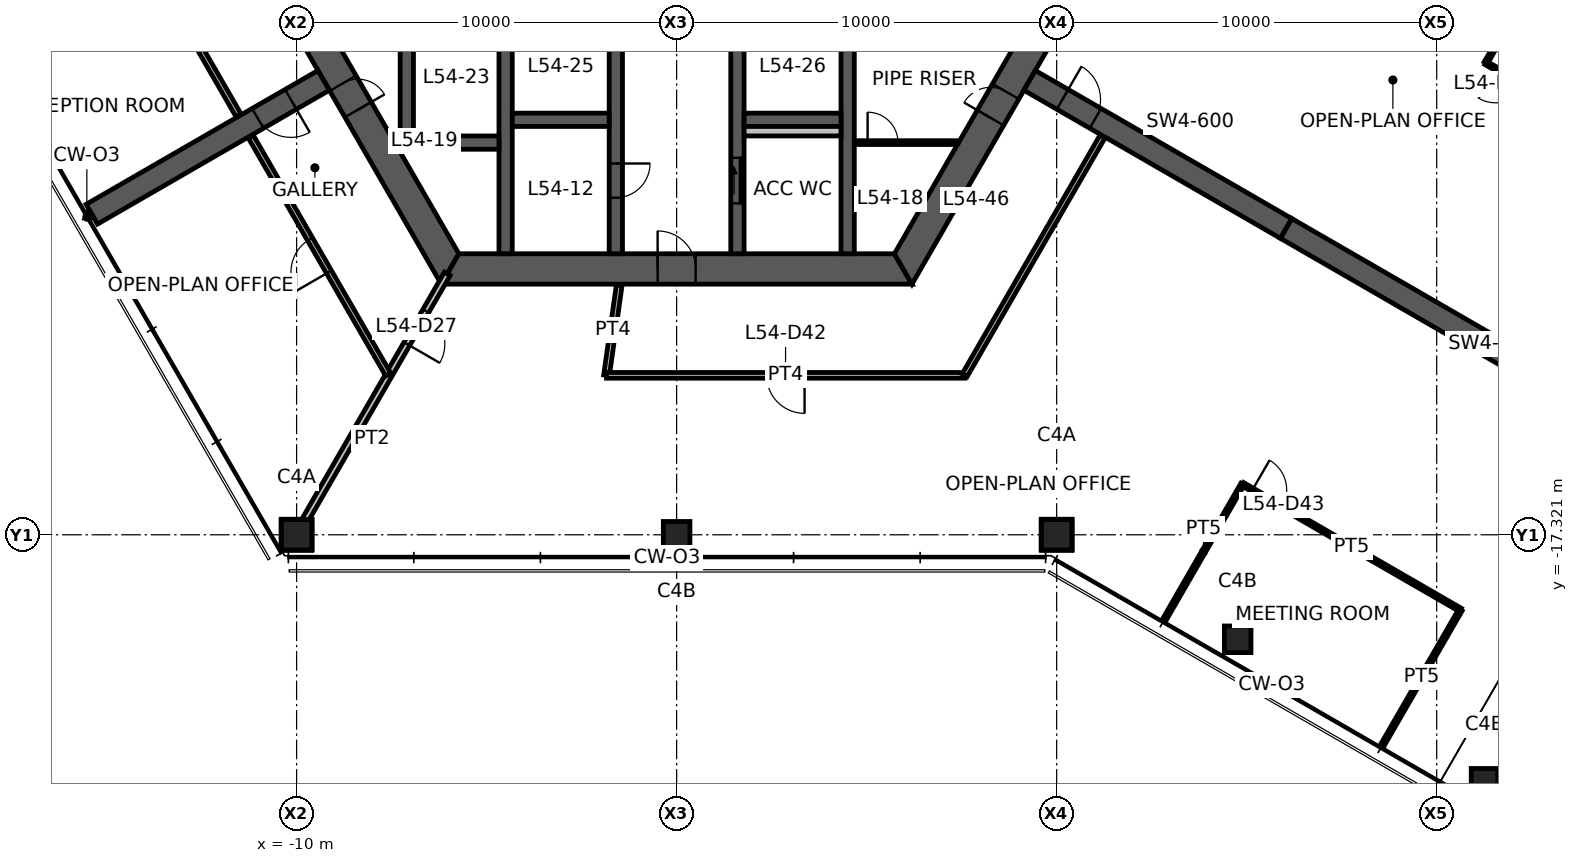
"""IFC4 building model, lengths in metres.
Left out: names, types, materials, properties, quantities, classifications, styles, units other than length and angle.
Written with IfcOpenShell. Run it as: python <this file> out.ifc"""

import sys

from ifc_helpers import new_model, si_unit, direction, frame, frame_2d, origin, origin_2d, place, context, subcontext, project, spatial, polyline, rectangle, hollow_rectangle, outline, extrude, element, fill, save


model = new_model("IFC4")
c1 = context("Model", 3, precision=1e-05, world=origin(), true_north=direction((0.0, 1.0)))
c2 = subcontext(c1, "Body", "Model", "MODEL_VIEW")
j1 = project(units=[si_unit("LENGTHUNIT", "METRE"), si_unit("PLANEANGLEUNIT", "RADIAN")], contexts=[c1])
p1 = place(None, origin())
s1 = spatial("IfcSite", under=j1, at=p1, CompositionType="ELEMENT")
p2 = place(p1, origin())
s2 = spatial("IfcBuilding", under=s1, at=p2, CompositionType="ELEMENT")
p3 = place(p2, frame((0.0, 0.0, 216.7)))
s3 = spatial("IfcBuildingStorey", under=s2, at=p3, CompositionType="ELEMENT", Elevation=216.7)
for number, where, z_axis, x_axis in (
    (1, (-10.0, -17.321, 0.0), (0.0, 0.0, 1.0), (1.0, 0.0, 0.0)),
    (2, (10.0, -17.321, 0.0), (0.0, 0.0, 1.0), (1.0, 0.0, 0.0)),
):
    element("IfcColumn", number, at=place(p3, frame(where, z_axis=z_axis, x_axis=x_axis)), inside=s3, PredefinedType="COLUMN", context=c2, shape_type="SweptSolid", body=[
        extrude(hollow_rectangle(XDim=0.8, YDim=0.8, WallThickness=0.04, at=origin_2d()), origin(), (0.0, 0.0, 1.0), 3.9),
    ])
for number, where, z_axis, x_axis in (
    (3, (0.0, -17.321, 0.0), (0.0, 0.0, 1.0), (1.0, 0.0, 0.0)),
    (4, (14.763, -20.071, 0.0), (0.0, 0.0, 1.0), (1.0, 0.0, 0.0)),
    (5, (21.258, -23.821, 0.0), (0.0, 0.0, 1.0), (1.0, 0.0, 0.0)),
):
    element("IfcColumn", number, at=place(p3, frame(where, z_axis=z_axis, x_axis=x_axis)), inside=s3, PredefinedType="COLUMN", context=c2, shape_type="SweptSolid", body=[
        extrude(hollow_rectangle(XDim=0.7, YDim=0.7, WallThickness=0.032, at=origin_2d()), origin(), (0.0, 0.0, 1.0), 3.9),
    ])
p4 = place(p3, frame((-11.922, 0.0, 0.0), z_axis=(0.0, 0.0, 1.0), x_axis=(0.500004296715, -0.866022923061, 0.0)))
e6 = element("IfcWall", 6, at=p4, inside=s3, PredefinedType="SHEAR", context=c2, shape_type="SweptSolid", body=[
    extrude(outline(polyline([(-0.231, -0.4), (6.281, -0.4), (7.081, -0.4), (12.153, -0.4), (11.691, 0.4), (7.081, 0.4), (6.281, 0.4), (0.231, 0.4), (-0.231, -0.4)])), origin(), (0.0, 0.0, 1.0), 3.9),
])
p5 = place(p4, frame((6.281, 0.0, 0.0)))
e7 = element("IfcOpeningElement", 7, at=p5, cuts=e6, PredefinedType="OPENING", context=c2, shape_type="SweptSolid", body=[
    extrude(rectangle(XDim=0.8, YDim=2.1, at=frame_2d((0.4, 1.05))), frame((0.0, 0.41, 0.0), z_axis=(0.0, -1.0, 0.0), x_axis=(1.0, 0.0, 0.0)), (0.0, 0.0, 1.0), 0.82),
])
p6 = place(p3, frame((-5.961, -10.325, 0.0), z_axis=(0.0, 0.0, 1.0), x_axis=(1.0, 0.0, 0.0)))
e8 = element("IfcWall", 8, at=p6, inside=s3, PredefinedType="SHEAR", context=c2, shape_type="SweptSolid", body=[
    extrude(outline(polyline([(-0.231, -0.4), (5.461, -0.4), (6.461, -0.4), (12.153, -0.4), (11.691, 0.4), (6.461, 0.4), (5.461, 0.4), (0.231, 0.4), (-0.231, -0.4)])), origin(), (0.0, 0.0, 1.0), 3.9),
])
p7 = place(p6, frame((5.461, 0.0, 0.0)))
e9 = element("IfcOpeningElement", 9, at=p7, cuts=e8, PredefinedType="OPENING", context=c2, shape_type="SweptSolid", body=[
    extrude(rectangle(XDim=1.0, YDim=2.1, at=frame_2d((0.5, 1.05))), frame((0.0, 0.41, 0.0), z_axis=(0.0, -1.0, 0.0), x_axis=(1.0, 0.0, 0.0)), (0.0, 0.0, 1.0), 0.82),
])
p8 = place(p3, frame((5.961, -10.325, 0.0), z_axis=(0.0, 0.0, 1.0), x_axis=(0.500004296715, 0.866022923061, 0.0)))
e10 = element("IfcWall", 10, at=p8, inside=s3, PredefinedType="SHEAR", context=c2, shape_type="SweptSolid", body=[
    extrude(outline(polyline([(-0.231, -0.4), (4.594, -0.4), (5.394, -0.4), (12.153, -0.4), (11.691, 0.4), (5.394, 0.4), (4.594, 0.4), (0.231, 0.4), (-0.231, -0.4)])), origin(), (0.0, 0.0, 1.0), 3.9),
])
p9 = place(p8, frame((4.594, 0.0, 0.0)))
e11 = element("IfcOpeningElement", 11, at=p9, cuts=e10, PredefinedType="OPENING", context=c2, shape_type="SweptSolid", body=[
    extrude(rectangle(XDim=0.8, YDim=2.1, at=frame_2d((0.4, 1.05))), frame((0.0, 0.41, 0.0), z_axis=(0.0, -1.0, 0.0), x_axis=(1.0, 0.0, 0.0)), (0.0, 0.0, 1.0), 0.82),
])
p10 = place(p3, frame((-9.288, -5.363, 0.0), z_axis=(0.0, 0.0, 1.0), x_axis=(-0.866027473358, -0.499996415376, 0.0)))
e12 = element("IfcWall", 12, at=p10, inside=s3, PredefinedType="SHEAR", context=c2, shape_type="SweptSolid", body=[
    extrude(rectangle(XDim=7.045, YDim=0.6, at=frame_2d((3.523, 0.0))), origin(), (0.0, 0.0, 1.0), 3.9),
])
p11 = place(p10, frame((1.0, 0.0, 0.0)))
e13 = element("IfcOpeningElement", 13, at=p11, cuts=e12, PredefinedType="OPENING", context=c2, shape_type="SweptSolid", body=[
    extrude(rectangle(XDim=1.0, YDim=2.1, at=frame_2d((0.5, 1.05))), frame((0.0, 0.31, 0.0), z_axis=(0.0, -1.0, 0.0), x_axis=(1.0, 0.0, 0.0)), (0.0, 0.0, 1.0), 0.62),
])
p12 = place(p3, frame((9.288, -5.363, 0.0), z_axis=(0.0, 0.0, 1.0), x_axis=(0.866031736626, -0.499989031036, 0.0)))
e14 = element("IfcWall", 14, at=p12, inside=s3, PredefinedType="SHEAR", context=c2, shape_type="SweptSolid", body=[
    extrude(rectangle(XDim=7.796, YDim=0.6, at=frame_2d((3.898, 0.0))), origin(), (0.0, 0.0, 1.0), 3.9),
])
p13 = place(p12, frame((1.0, 0.0, 0.0)))
e15 = element("IfcOpeningElement", 15, at=p13, cuts=e14, PredefinedType="OPENING", context=c2, shape_type="SweptSolid", body=[
    extrude(rectangle(XDim=1.0, YDim=2.1, at=frame_2d((0.5, 1.05))), frame((0.0, 0.31, 0.0), z_axis=(0.0, -1.0, 0.0), x_axis=(1.0, 0.0, 0.0)), (0.0, 0.0, 1.0), 0.62),
])
p14 = place(p3, frame((16.039, -9.26, 0.0), z_axis=(0.0, 0.0, 1.0), x_axis=(0.866024837091, -0.50000098154, 0.0)))
e16 = element("IfcWall", 16, at=p14, inside=s3, PredefinedType="SHEAR", context=c2, shape_type="SweptSolid", body=[
    extrude(rectangle(XDim=13.0, YDim=0.6, at=frame_2d((6.5, 0.0))), origin(), (0.0, 0.0, 1.0), 3.9),
])
p15 = place(p3, frame((-1.6, -3.775, 0.0), z_axis=(0.0, 0.0, 1.0), x_axis=(0.0, -1.0, 0.0)))
e17 = element("IfcWall", 17, at=p15, inside=s3, PredefinedType="SHEAR", context=c2, shape_type="SweptSolid", body=[
    extrude(rectangle(XDim=6.15, YDim=0.35, at=frame_2d((3.075, 0.0))), origin(), (0.0, 0.0, 1.0), 3.9),
])
p16 = place(p15, frame((3.775, 0.0, 0.0)))
e18 = element("IfcOpeningElement", 18, at=p16, cuts=e17, PredefinedType="OPENING", context=c2, shape_type="SweptSolid", body=[
    extrude(rectangle(XDim=0.9, YDim=2.1, at=frame_2d((0.45, 1.05))), frame((0.0, 0.185, 0.0), z_axis=(0.0, -1.0, 0.0), x_axis=(1.0, 0.0, 0.0)), (0.0, 0.0, 1.0), 0.37),
])
p17 = place(p3, frame((1.6, -3.775, 0.0), z_axis=(0.0, 0.0, 1.0), x_axis=(0.0, -1.0, 0.0)))
e19 = element("IfcWall", 19, at=p17, inside=s3, PredefinedType="SHEAR", context=c2, shape_type="SweptSolid", body=[
    extrude(rectangle(XDim=6.15, YDim=0.35, at=frame_2d((3.075, 0.0))), origin(), (0.0, 0.0, 1.0), 3.9),
])
p18 = place(p17, frame((3.625, 0.0, 0.0)))
e20 = element("IfcOpeningElement", 20, at=p18, cuts=e19, PredefinedType="OPENING", context=c2, shape_type="SweptSolid", body=[
    extrude(rectangle(XDim=1.2, YDim=2.1, at=frame_2d((0.6, 1.05))), frame((0.0, 0.185, 0.0), z_axis=(0.0, -1.0, 0.0), x_axis=(1.0, 0.0, 0.0)), (0.0, 0.0, 1.0), 0.37),
])
for number, where, z_axis, x_axis in (
    (21, (-4.5, -3.775, 0.0), (0.0, 0.0, 1.0), (0.0, -1.0, 0.0)),
    (22, (4.5, -3.775, 0.0), (0.0, 0.0, 1.0), (0.0, -1.0, 0.0)),
):
    element("IfcWall", number, at=place(p3, frame(where, z_axis=z_axis, x_axis=x_axis)), inside=s3, PredefinedType="SHEAR", context=c2, shape_type="SweptSolid", body=[
        extrude(rectangle(XDim=6.15, YDim=0.35, at=frame_2d((3.075, 0.0))), origin(), (0.0, 0.0, 1.0), 3.9),
    ])
for number, where, z_axis, x_axis in (
    (23, (-4.325, -6.4, 0.0), (0.0, 0.0, 1.0), (1.0, 0.0, 0.0)),
    (24, (1.775, -6.4, 0.0), (0.0, 0.0, 1.0), (1.0, 0.0, 0.0)),
):
    element("IfcWall", number, at=place(p3, frame(where, z_axis=z_axis, x_axis=x_axis)), inside=s3, PredefinedType="SHEAR", context=c2, shape_type="SweptSolid", body=[
        extrude(rectangle(XDim=2.55, YDim=0.35, at=frame_2d((1.275, 0.0))), origin(), (0.0, 0.0, 1.0), 3.9),
    ])
p19 = place(p3, frame((-7.275, -7.0, 0.0), z_axis=(0.0, 0.0, 1.0), x_axis=(1.0, 0.0, 0.0)))
e25 = element("IfcWall", 25, at=p19, inside=s3, PredefinedType="SHEAR", context=c2, shape_type="SweptSolid", body=[
    extrude(rectangle(XDim=2.6, YDim=0.35, at=frame_2d((1.3, 0.0))), origin(), (0.0, 0.0, 1.0), 3.9),
])
p20 = place(p3, frame((-7.1, -3.775, 0.0), z_axis=(0.0, 0.0, 1.0), x_axis=(0.0, -1.0, 0.0)))
e26 = element("IfcWall", 26, at=p20, inside=s3, PredefinedType="SHEAR", context=c2, shape_type="SweptSolid", body=[
    extrude(rectangle(XDim=3.05, YDim=0.35, at=frame_2d((1.525, 0.0))), origin(), (0.0, 0.0, 1.0), 3.9),
])
p21 = place(p3, frame((1.775, -6.7, 0.0), z_axis=(0.0, 0.0, 1.0), x_axis=(1.0, 0.0, 0.0)))
e27 = element("IfcWall", 27, at=p21, inside=s3, PredefinedType="PLUMBINGWALL", context=c2, shape_type="SweptSolid", body=[
    extrude(rectangle(XDim=2.55, YDim=0.25, at=frame_2d((1.275, 0.0))), origin(), (0.0, 0.0, 1.0), 3.9),
])
p22 = place(p3, frame((4.675, -7.0, 0.0), z_axis=(0.0, 0.0, 1.0), x_axis=(1.0, 0.0, 0.0)))
e28 = element("IfcWall", 28, at=p22, inside=s3, PredefinedType="PARTITIONING", context=c2, shape_type="SweptSolid", body=[
    extrude(outline(polyline([(0.0, -0.05), (0.35, -0.05), (1.15, -0.05), (2.715, -0.05), (2.744, 0.0), (2.75, 0.05), (1.15, 0.05), (0.35, 0.05), (0.0, 0.05), (0.0, -0.05)])), origin(), (0.0, 0.0, 1.0), 2.95),
])
p23 = place(p22, frame((0.35, 0.0, 0.0)))
e29 = element("IfcOpeningElement", 29, at=p23, cuts=e28, PredefinedType="OPENING", context=c2, shape_type="SweptSolid", body=[
    extrude(rectangle(XDim=0.8, YDim=2.1, at=frame_2d((0.4, 1.05))), frame((0.0, 0.06, 0.0), z_axis=(0.0, -1.0, 0.0), x_axis=(1.0, 0.0, 0.0)), (0.0, 0.0, 1.0), 0.12),
])
p24 = place(p3, frame((-6.035, -10.453, 0.0), z_axis=(0.0, 0.0, 1.0), x_axis=(-0.499989830942, -0.866031274813, 0.0)))
e30 = element("IfcWall", 30, at=p24, inside=s3, PredefinedType="PARTITIONING", context=c2, shape_type="SweptSolid", body=[
    extrude(rectangle(XDim=7.93, YDim=0.175, at=frame_2d((3.965, 0.0))), origin(), (0.0, 0.0, 1.0), 3.05),
])
p25 = place(p24, frame((1.13, 0.0, 0.0)))
e31 = element("IfcOpeningElement", 31, at=p25, cuts=e30, PredefinedType="OPENING", context=c2, shape_type="SweptSolid", body=[
    extrude(rectangle(XDim=1.0, YDim=2.1, at=frame_2d((0.5, 1.05))), frame((0.0, 0.098, 0.0), z_axis=(0.0, -1.0, 0.0), x_axis=(1.0, 0.0, 0.0)), (0.0, 0.0, 1.0), 0.195),
])
p26 = place(p3, frame((-11.527, -6.285, 0.0), z_axis=(0.0, 0.0, 1.0), x_axis=(-0.500003537243, 0.866023361547, 0.0)))
e32 = element("IfcWall", 32, at=p26, inside=s3, PredefinedType="PARTITIONING", context=c2, shape_type="SweptSolid", body=[
    extrude(rectangle(XDim=6.516, YDim=0.15, at=frame_2d((3.258, 0.0))), origin(), (0.0, 0.0, 1.0), 2.95),
])
p27 = place(p3, frame((-7.589, -13.105, 0.0), z_axis=(0.0, 0.0, 1.0), x_axis=(-0.499986333712, 0.866033293876, 0.0)))
e33 = element("IfcWall", 33, at=p27, inside=s3, PredefinedType="PARTITIONING", context=c2, shape_type="SweptSolid", body=[
    extrude(rectangle(XDim=7.235, YDim=0.15, at=frame_2d((3.617, 0.0))), origin(), (0.0, 0.0, 1.0), 2.95),
])
p28 = place(p27, frame((3.117, 0.0, 0.0)))
e34 = element("IfcOpeningElement", 34, at=p28, cuts=e33, PredefinedType="OPENING", context=c2, shape_type="SweptSolid", body=[
    extrude(rectangle(XDim=1.0, YDim=2.1, at=frame_2d((0.5, 1.05))), frame((0.0, 0.085, 0.0), z_axis=(0.0, -1.0, 0.0), x_axis=(1.0, 0.0, 0.0)), (0.0, 0.0, 1.0), 0.17),
])
p29 = place(p3, frame((21.292, -4.903, 0.0), z_axis=(0.0, 0.0, 1.0), x_axis=(0.500000428765, 0.866025156237, 0.0)))
e35 = element("IfcWall", 35, at=p29, inside=s3, PredefinedType="PARTITIONING", context=c2, shape_type="SweptSolid", body=[
    extrude(rectangle(XDim=4.08, YDim=0.1, at=frame_2d((2.04, 0.0))), origin(), (0.0, 0.0, 1.0), 2.95),
])
p30 = place(p3, frame((27.025, -8.213, 0.0), z_axis=(0.0, 0.0, 1.0), x_axis=(-0.866021597574, 0.500006592492, 0.0)))
e36 = element("IfcWall", 36, at=p30, inside=s3, PredefinedType="PARTITIONING", context=c2, shape_type="SweptSolid", body=[
    extrude(rectangle(XDim=6.62, YDim=0.1, at=frame_2d((3.31, 0.0))), origin(), (0.0, 0.0, 1.0), 2.95),
])
p31 = place(p30, frame((5.42, 0.0, 0.0)))
e37 = element("IfcOpeningElement", 37, at=p31, cuts=e36, PredefinedType="OPENING", context=c2, shape_type="SweptSolid", body=[
    extrude(rectangle(XDim=0.9, YDim=2.1, at=frame_2d((0.45, 1.05))), frame((0.0, 0.06, 0.0), z_axis=(0.0, -1.0, 0.0), x_axis=(1.0, 0.0, 0.0)), (0.0, 0.0, 1.0), 0.12),
])
p32 = place(p3, frame((-1.844, -13.125, 0.0), z_axis=(0.0, 0.0, 1.0), x_axis=(0.139173892267, 0.99026795753, 0.0)))
e38 = element("IfcWall", 38, at=p32, inside=s3, PredefinedType="PARTITIONING", context=c2, shape_type="SweptSolid", body=[
    extrude(rectangle(XDim=2.403, YDim=0.15, at=frame_2d((1.202, 0.0))), origin(), (0.0, 0.0, 1.0), 2.95),
])
p33 = place(p3, frame((7.578, -13.125, 0.0), z_axis=(0.0, 0.0, 1.0), x_axis=(-1.0, 0.0, 0.0)))
e39 = element("IfcWall", 39, at=p33, inside=s3, PredefinedType="PARTITIONING", context=c2, shape_type="SweptSolid", body=[
    extrude(rectangle(XDim=9.422, YDim=0.15, at=frame_2d((4.711, 0.0))), origin(), (0.0, 0.0, 1.0), 2.95),
])
p34 = place(p33, frame((4.211, 0.0, 0.0)))
e40 = element("IfcOpeningElement", 40, at=p34, cuts=e39, PredefinedType="OPENING", context=c2, shape_type="SweptSolid", body=[
    extrude(rectangle(XDim=1.0, YDim=2.1, at=frame_2d((0.5, 1.05))), frame((0.0, 0.085, 0.0), z_axis=(0.0, -1.0, 0.0), x_axis=(1.0, 0.0, 0.0)), (0.0, 0.0, 1.0), 0.17),
])
p35 = place(p3, frame((11.207, -6.84, 0.0), z_axis=(0.0, 0.0, 1.0), x_axis=(-0.500002959843, -0.866023694911, 0.0)))
e41 = element("IfcWall", 41, at=p35, inside=s3, PredefinedType="PARTITIONING", context=c2, shape_type="SweptSolid", body=[
    extrude(rectangle(XDim=7.258, YDim=0.15, at=frame_2d((3.629, 0.0))), origin(), (0.0, 0.0, 1.0), 2.95),
])
p36 = place(p3, frame((12.837, -19.548, 0.0), z_axis=(0.0, 0.0, 1.0), x_axis=(0.499965833383, 0.866045128991, 0.0)))
e42 = element("IfcWall", 42, at=p36, inside=s3, PredefinedType="PARTITIONING", context=c2, shape_type="SweptSolid", body=[
    extrude(rectangle(XDim=4.11, YDim=0.1, at=frame_2d((2.055, 0.0))), origin(), (0.0, 0.0, 1.0), 2.95),
])
p37 = place(p3, frame((14.892, -15.988, 0.0), z_axis=(0.0, 0.0, 1.0), x_axis=(0.866030817826, -0.499990622488, 0.0)))
e43 = element("IfcWall", 43, at=p37, inside=s3, PredefinedType="PARTITIONING", context=c2, shape_type="SweptSolid", body=[
    extrude(rectangle(XDim=6.62, YDim=0.1, at=frame_2d((3.31, 0.0))), origin(), (0.0, 0.0, 1.0), 2.95),
])
p38 = place(p37, frame((0.3, 0.0, 0.0)))
e44 = element("IfcOpeningElement", 44, at=p38, cuts=e43, PredefinedType="OPENING", context=c2, shape_type="SweptSolid", body=[
    extrude(rectangle(XDim=0.9, YDim=2.1, at=frame_2d((0.45, 1.05))), frame((0.0, 0.06, 0.0), z_axis=(0.0, -1.0, 0.0), x_axis=(1.0, 0.0, 0.0)), (0.0, 0.0, 1.0), 0.12),
])
p39 = place(p3, frame((20.625, -19.298, 0.0), z_axis=(0.0, 0.0, 1.0), x_axis=(-0.500000428765, -0.866025156237, 0.0)))
e45 = element("IfcWall", 45, at=p39, inside=s3, PredefinedType="PARTITIONING", context=c2, shape_type="SweptSolid", body=[
    extrude(rectangle(XDim=4.08, YDim=0.1, at=frame_2d((2.04, 0.0))), origin(), (0.0, 0.0, 1.0), 2.95),
])
p40 = place(p3, frame((-15.39, -8.885, 0.0), z_axis=(0.0, 0.0, 1.0), x_axis=(-0.866472036435, -0.499225610396, 0.0)))
e46 = element("IfcWall", 46, at=p40, inside=s3, PredefinedType="PARTITIONING", context=c2, shape_type="SweptSolid", body=[
    extrude(rectangle(XDim=0.085, YDim=0.175, at=frame_2d((0.042, 0.0))), origin(), (0.0, 0.0, 1.0), 3.9),
])
p41 = place(p7, origin())
e47 = element("IfcDoor", 47, at=p41, inside=s3, OperationType="SINGLE_SWING_LEFT", PredefinedType="DOOR", context=c2, shape_type="SweptSolid", body=[
    extrude(rectangle(XDim=1.0, YDim=2.1, at=frame_2d((0.5, 1.05))), frame((0.0, 0.025, 0.0), z_axis=(0.0, -1.0, 0.0), x_axis=(1.0, 0.0, 0.0)), (0.0, 0.0, 1.0), 0.05),
])
fill(e9, e47)
p42 = place(p9, origin())
e48 = element("IfcDoor", 48, at=p42, inside=s3, OperationType="SINGLE_SWING_LEFT", PredefinedType="DOOR", context=c2, shape_type="SweptSolid", body=[
    extrude(rectangle(XDim=0.8, YDim=2.1, at=frame_2d((0.4, 1.05))), frame((0.0, 0.025, 0.0), z_axis=(0.0, -1.0, 0.0), x_axis=(1.0, 0.0, 0.0)), (0.0, 0.0, 1.0), 0.05),
])
fill(e11, e48)
p43 = place(p5, origin())
e49 = element("IfcDoor", 49, at=p43, inside=s3, OperationType="SINGLE_SWING_RIGHT", PredefinedType="DOOR", context=c2, shape_type="SweptSolid", body=[
    extrude(rectangle(XDim=0.8, YDim=2.1, at=frame_2d((0.4, 1.05))), frame((0.0, 0.025, 0.0), z_axis=(0.0, -1.0, 0.0), x_axis=(1.0, 0.0, 0.0)), (0.0, 0.0, 1.0), 0.05),
])
fill(e7, e49)
p44 = place(p18, origin())
e50 = element("IfcDoor", 50, at=p44, inside=s3, OperationType="SLIDING_TO_LEFT", PredefinedType="DOOR", context=c2, shape_type="SweptSolid", body=[
    extrude(rectangle(XDim=1.2, YDim=2.1, at=frame_2d((0.6, 1.05))), frame((0.0, 0.025, 0.0), z_axis=(0.0, -1.0, 0.0), x_axis=(1.0, 0.0, 0.0)), (0.0, 0.0, 1.0), 0.05),
])
fill(e20, e50)
p45 = place(p16, origin())
e51 = element("IfcDoor", 51, at=p45, inside=s3, OperationType="SINGLE_SWING_LEFT", PredefinedType="DOOR", context=c2, shape_type="SweptSolid", body=[
    extrude(rectangle(XDim=0.9, YDim=2.1, at=frame_2d((0.45, 1.05))), frame((0.0, 0.025, 0.0), z_axis=(0.0, -1.0, 0.0), x_axis=(1.0, 0.0, 0.0)), (0.0, 0.0, 1.0), 0.05),
])
fill(e18, e51)
p46 = place(p11, origin())
e52 = element("IfcDoor", 52, at=p46, inside=s3, OperationType="SINGLE_SWING_LEFT", PredefinedType="DOOR", context=c2, shape_type="SweptSolid", body=[
    extrude(rectangle(XDim=1.0, YDim=2.1, at=frame_2d((0.5, 1.05))), frame((0.0, 0.025, 0.0), z_axis=(0.0, -1.0, 0.0), x_axis=(1.0, 0.0, 0.0)), (0.0, 0.0, 1.0), 0.05),
])
fill(e13, e52)
p47 = place(p13, origin())
e53 = element("IfcDoor", 53, at=p47, inside=s3, OperationType="SINGLE_SWING_LEFT", PredefinedType="DOOR", context=c2, shape_type="SweptSolid", body=[
    extrude(rectangle(XDim=1.0, YDim=2.1, at=frame_2d((0.5, 1.05))), frame((0.0, 0.025, 0.0), z_axis=(0.0, -1.0, 0.0), x_axis=(1.0, 0.0, 0.0)), (0.0, 0.0, 1.0), 0.05),
])
fill(e15, e53)
p48 = place(p23, origin())
e54 = element("IfcDoor", 54, at=p48, inside=s3, OperationType="SINGLE_SWING_LEFT", PredefinedType="DOOR", context=c2, shape_type="SweptSolid", body=[
    extrude(rectangle(XDim=0.8, YDim=2.1, at=frame_2d((0.4, 1.05))), frame((0.0, 0.025, 0.0), z_axis=(0.0, -1.0, 0.0), x_axis=(1.0, 0.0, 0.0)), (0.0, 0.0, 1.0), 0.05),
])
fill(e29, e54)
p49 = place(p25, origin())
e55 = element("IfcDoor", 55, at=p49, inside=s3, OperationType="SINGLE_SWING_RIGHT", PredefinedType="DOOR", context=c2, shape_type="SweptSolid", body=[
    extrude(rectangle(XDim=1.0, YDim=2.1, at=frame_2d((0.5, 1.05))), frame((0.0, 0.025, 0.0), z_axis=(0.0, -1.0, 0.0), x_axis=(1.0, 0.0, 0.0)), (0.0, 0.0, 1.0), 0.05),
])
fill(e31, e55)
p50 = place(p28, origin())
e56 = element("IfcDoor", 56, at=p50, inside=s3, OperationType="SINGLE_SWING_LEFT", PredefinedType="DOOR", context=c2, shape_type="SweptSolid", body=[
    extrude(rectangle(XDim=1.0, YDim=2.1, at=frame_2d((0.5, 1.05))), frame((0.0, 0.025, 0.0), z_axis=(0.0, -1.0, 0.0), x_axis=(1.0, 0.0, 0.0)), (0.0, 0.0, 1.0), 0.05),
])
fill(e34, e56)
p51 = place(p31, origin())
e57 = element("IfcDoor", 57, at=p51, inside=s3, OperationType="SINGLE_SWING_RIGHT", PredefinedType="DOOR", context=c2, shape_type="SweptSolid", body=[
    extrude(rectangle(XDim=0.9, YDim=2.1, at=frame_2d((0.45, 1.05))), frame((0.0, 0.025, 0.0), z_axis=(0.0, -1.0, 0.0), x_axis=(1.0, 0.0, 0.0)), (0.0, 0.0, 1.0), 0.05),
])
fill(e37, e57)
p52 = place(p34, origin())
e58 = element("IfcDoor", 58, at=p52, inside=s3, OperationType="SINGLE_SWING_LEFT", PredefinedType="DOOR", context=c2, shape_type="SweptSolid", body=[
    extrude(rectangle(XDim=1.0, YDim=2.1, at=frame_2d((0.5, 1.05))), frame((0.0, 0.025, 0.0), z_axis=(0.0, -1.0, 0.0), x_axis=(1.0, 0.0, 0.0)), (0.0, 0.0, 1.0), 0.05),
])
fill(e40, e58)
p53 = place(p38, origin())
e59 = element("IfcDoor", 59, at=p53, inside=s3, OperationType="SINGLE_SWING_LEFT", PredefinedType="DOOR", context=c2, shape_type="SweptSolid", body=[
    extrude(rectangle(XDim=0.9, YDim=2.1, at=frame_2d((0.45, 1.05))), frame((0.0, 0.025, 0.0), z_axis=(0.0, -1.0, 0.0), x_axis=(1.0, 0.0, 0.0)), (0.0, 0.0, 1.0), 0.05),
])
fill(e44, e59)
save(model, sys.argv[1])
